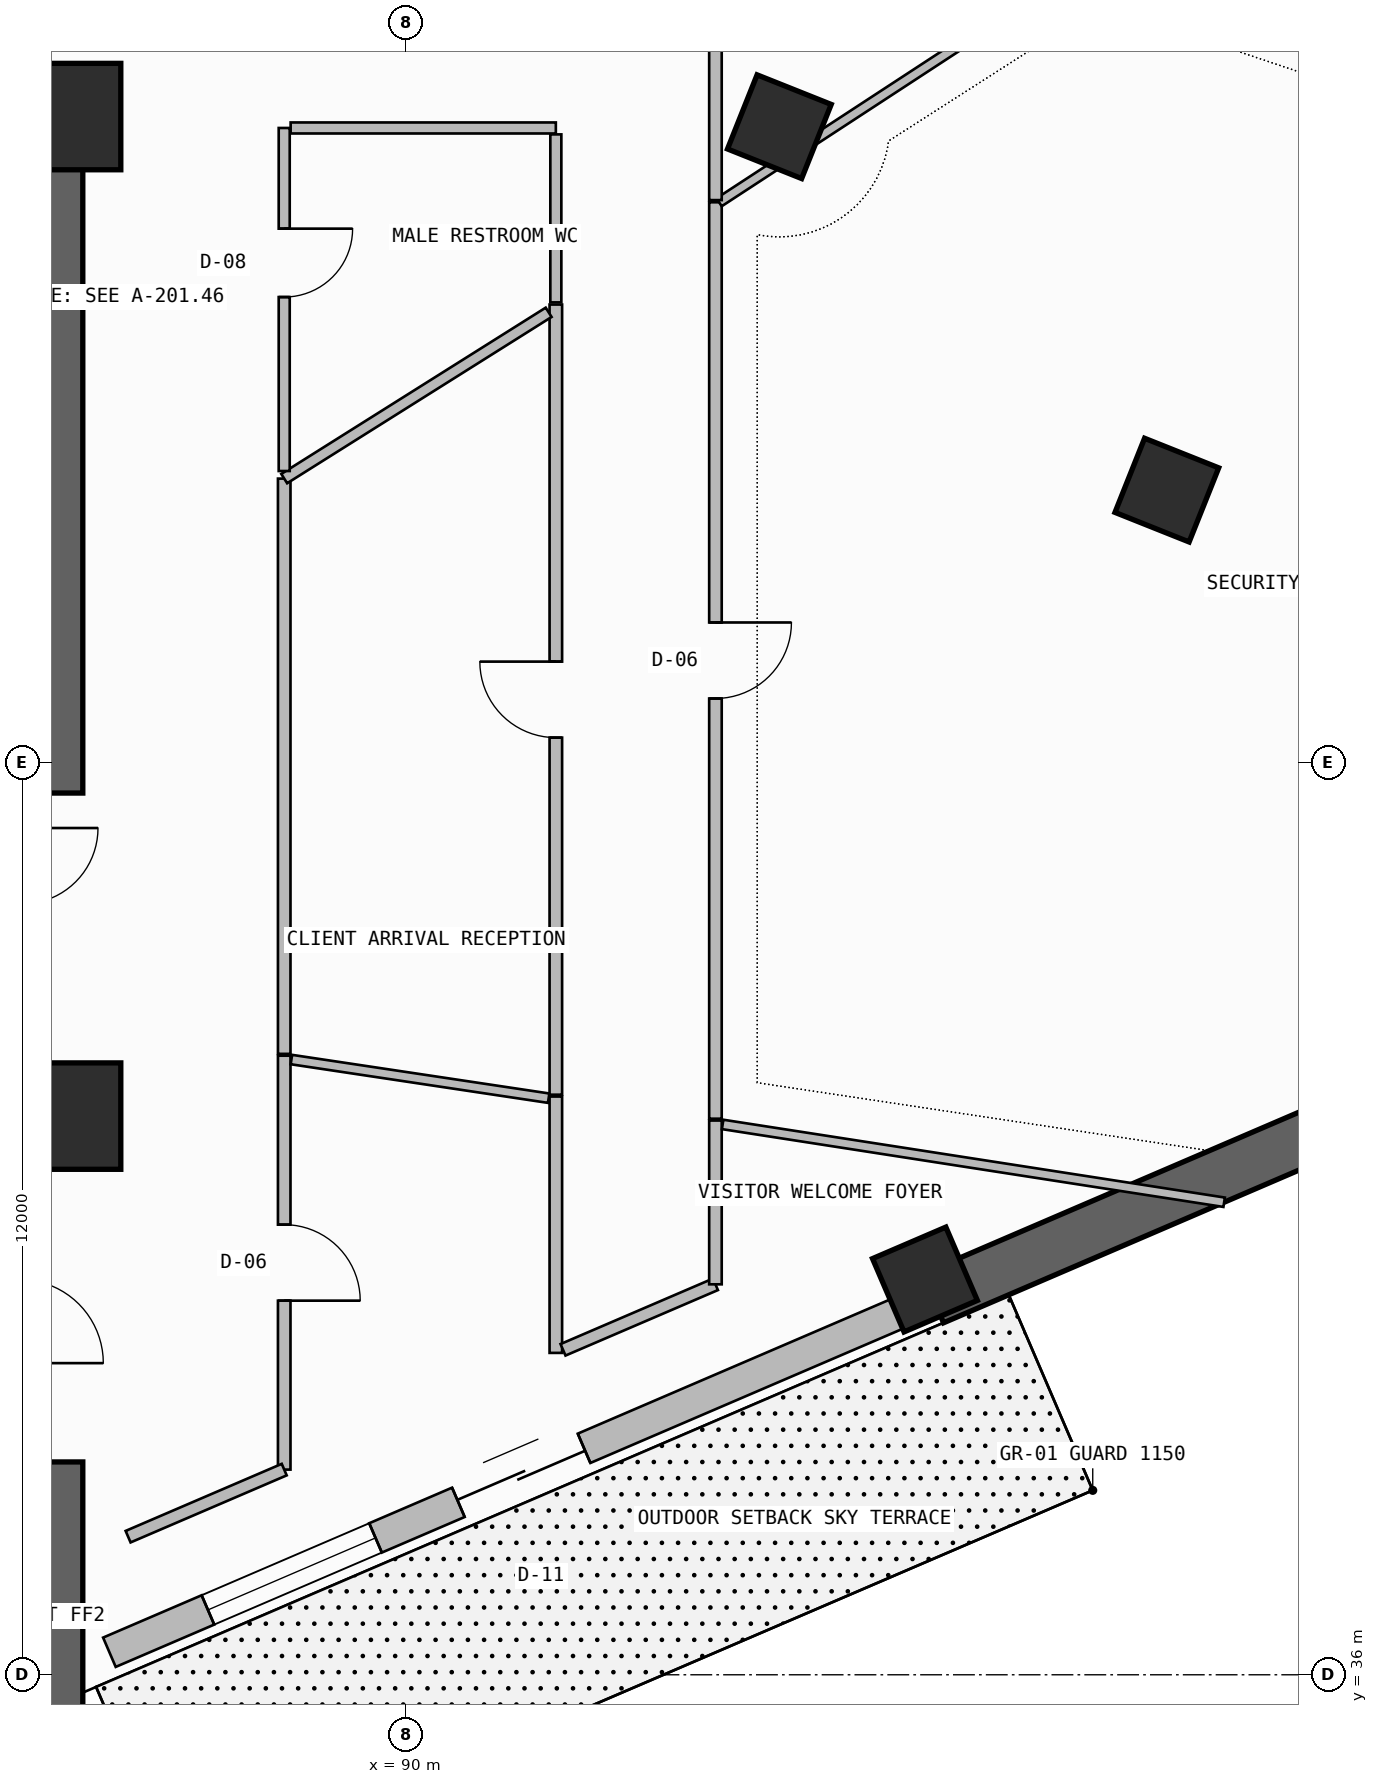
"""IFC4 building model, lengths in metres.
Left out: names, types, materials, properties, quantities, classifications, styles, units other than length and angle.
Written with IfcOpenShell. Run it as: python <this file> out.ifc"""

import sys

from ifc_helpers import new_model, si_unit, direction, frame, frame_2d, origin, origin_2d, place, context, subcontext, project, spatial, rectangle, extrude, element, fill, save


model = new_model("IFC4")
c1 = context("Model", 3, precision=1e-05, world=origin(), true_north=direction((0.0, 1.0)))
c2 = subcontext(c1, "Body", "Model", "MODEL_VIEW")
j1 = project(units=[si_unit("LENGTHUNIT", "METRE"), si_unit("PLANEANGLEUNIT", "RADIAN")], contexts=[c1])
p1 = place(None, origin())
s1 = spatial("IfcSite", under=j1, at=p1, CompositionType="ELEMENT")
p2 = place(p1, origin())
s2 = spatial("IfcBuilding", under=s1, at=p2, CompositionType="ELEMENT")
p3 = place(p2, frame((0.0, 0.0, 164.7)))
s3 = spatial("IfcBuildingStorey", under=s2, at=p3, CompositionType="ELEMENT", Elevation=164.7)
p4 = place(p3, frame((85.375, 35.5, -0.4), z_axis=(0.0, 0.0, 1.0), x_axis=(0.0, 1.0, 0.0)))
e1 = element("IfcWall", 1, at=p4, inside=s3, PredefinedType="SHEAR", context=c2, shape_type="SweptSolid", body=[
    extrude(rectangle(XDim=3.3, YDim=0.75, at=frame_2d((1.65, 0.0))), origin(), (0.0, 0.0, 1.0), 3.74),
])
p5 = place(p3, frame((72.0, 56.425, -0.4), z_axis=(0.0, 0.0, 1.0), x_axis=(1.0, 0.0, 0.0)))
e2 = element("IfcWall", 2, at=p5, inside=s3, PredefinedType="SHEAR", context=c2, shape_type="SweptSolid", body=[
    extrude(rectangle(XDim=13.75, YDim=0.75, at=frame_2d((6.875, 0.0))), origin(), (0.0, 0.0, 1.0), 3.74),
])
p6 = place(p3, frame((85.375, 47.6, -0.4), z_axis=(0.0, 0.0, 1.0), x_axis=(0.0, 1.0, 0.0)))
e3 = element("IfcWall", 3, at=p6, inside=s3, PredefinedType="SHEAR", context=c2, shape_type="SweptSolid", body=[
    extrude(rectangle(XDim=8.45, YDim=0.75, at=frame_2d((4.225, 0.0))), origin(), (0.0, 0.0, 1.0), 3.74),
])
for number, where, z_axis, x_axis in (
    (4, (85.55, 43.35, 0.0), (0.0, 0.0, 1.0), (1.0, 0.0, 0.0)),
    (5, (85.55, 56.5, 0.0), (0.0, 0.0, 1.0), (1.0, 0.0, 0.0)),
):
    element("IfcColumn", number, at=place(p3, frame(where, z_axis=z_axis, x_axis=x_axis)), inside=s3, PredefinedType="COLUMN", context=c2, shape_type="SweptSolid", body=[
        extrude(rectangle(XDim=1.4, YDim=1.4, at=origin_2d()), origin(), (0.0, 0.0, 1.0), 3.6),
    ])
for number, where, z_axis, x_axis in (
    (6, (96.83, 41.2, -0.4), (0.0, 0.0, 1.0), (0.919, 0.395, 0.0)),
    (7, (100.013, 51.585, -0.4), (0.0, 0.0, 1.0), (0.371, 0.929, 0.0)),
    (8, (94.915, 56.367, -0.4), (0.0, 0.0, 1.0), (0.371, 0.929, 0.0)),
):
    element("IfcColumn", number, at=place(p3, frame(where, z_axis=z_axis, x_axis=x_axis)), inside=s3, PredefinedType="COLUMN", context=c2, shape_type="SweptSolid", body=[
        extrude(rectangle(XDim=1.05, YDim=1.05, at=origin_2d()), origin(), (0.0, 0.0, 1.0), 4.0),
    ])
p7 = place(p3, frame((86.1, 36.296, 0.0), z_axis=(0.0, 0.0, 1.0), x_axis=(0.918792412723, 0.394741057306, 0.0)))
e9 = element("IfcWall", 9, at=p7, inside=s3, PredefinedType="SOLIDWALL", context=c2, shape_type="SweptSolid", body=[
    extrude(rectangle(XDim=11.794, YDim=0.42, at=frame_2d((5.897, 0.0))), origin(), (0.0, 0.0, 1.0), 2.725),
])
p8 = place(p7, frame((4.997, 0.0, 0.0)))
e10 = element("IfcOpeningElement", 10, at=p8, cuts=e9, PredefinedType="OPENING", context=c2, shape_type="SweptSolid", body=[
    extrude(rectangle(XDim=1.8, YDim=2.35, at=frame_2d((0.9, 1.175))), frame((0.0, 0.22, 0.0), z_axis=(0.0, -1.0, 0.0), x_axis=(1.0, 0.0, 0.0)), (0.0, 0.0, 1.0), 0.44),
])
p9 = place(p7, frame((1.411, 0.0, 1.2)))
e11 = element("IfcOpeningElement", 11, at=p9, cuts=e9, PredefinedType="OPENING", context=c2, shape_type="SweptSolid", body=[
    extrude(rectangle(XDim=2.4, YDim=0.9, at=frame_2d((1.2, 0.45))), frame((0.0, 0.22, 0.0), z_axis=(0.0, -1.0, 0.0), x_axis=(1.0, 0.0, 0.0)), (0.0, 0.0, 1.0), 0.44),
])
p10 = place(p3, frame((96.937, 40.952, -0.4), z_axis=(0.0, 0.0, 1.0), x_axis=(0.918782407933, 0.394764343468, 0.0)))
e12 = element("IfcWall", 12, at=p10, inside=s3, PredefinedType="SHEAR", context=c2, shape_type="SweptSolid", body=[
    extrude(rectangle(XDim=8.402, YDim=0.7, at=frame_2d((4.201, 0.0))), origin(), (0.0, 0.0, 1.0), 3.74),
])
p11 = place(p3, frame((117.363, 52.344, 0.0), z_axis=(0.0, 0.0, 1.0), x_axis=(-0.94800468727, 0.31825636351, 0.0)))
e13 = element("IfcWall", 13, at=p11, inside=s3, PredefinedType="PARAPET", context=c2, shape_type="SweptSolid", body=[
    extrude(rectangle(XDim=31.869, YDim=0.2, at=frame_2d((15.935, 0.0))), origin(), (0.0, 0.0, 1.0), 1.15),
])
p12 = place(p3, frame((88.4, 38.699, 0.0), z_axis=(0.0, 0.0, 1.0), x_axis=(0.0, 1.0, 0.0)))
e14 = element("IfcWall", 14, at=p12, inside=s3, PredefinedType="PARTITIONING", context=c2, shape_type="SweptSolid", body=[
    extrude(rectangle(XDim=5.445, YDim=0.165, at=frame_2d((2.723, 0.0))), origin(), (0.0, 0.0, 1.0), 2.825),
])
p13 = place(p12, frame((2.223, 0.0, 0.0)))
e15 = element("IfcOpeningElement", 15, at=p13, cuts=e14, PredefinedType="OPENING", context=c2, shape_type="SweptSolid", body=[
    extrude(rectangle(XDim=1.0, YDim=2.2, at=frame_2d((0.5, 1.1))), frame((0.0, 0.093, 0.0), z_axis=(0.0, -1.0, 0.0), x_axis=(1.0, 0.0, 0.0)), (0.0, 0.0, 1.0), 0.185),
])
p14 = place(p3, frame((91.974, 43.607, 0.0), z_axis=(0.0, 0.0, 1.0), x_axis=(0.0, -1.0, 0.0)))
e16 = element("IfcWall", 16, at=p14, inside=s3, PredefinedType="PARTITIONING", context=c2, shape_type="SweptSolid", body=[
    extrude(rectangle(XDim=3.373, YDim=0.165, at=frame_2d((1.687, 0.0))), origin(), (0.0, 0.0, 1.0), 2.825),
])
p15 = place(p3, frame((92.068, 40.275, 0.0), z_axis=(0.0, 0.0, 1.0), x_axis=(0.91880916067, 0.394702072794, 0.0)))
e17 = element("IfcWall", 17, at=p15, inside=s3, PredefinedType="PARTITIONING", context=c2, shape_type="SweptSolid", body=[
    extrude(rectangle(XDim=2.183, YDim=0.165, at=frame_2d((1.091, 0.0))), origin(), (0.0, 0.0, 1.0), 3.34),
])
p16 = place(p3, frame((86.346, 37.817, 0.0), z_axis=(0.0, 0.0, 1.0), x_axis=(0.918811412195, 0.394696831531, 0.0)))
e18 = element("IfcWall", 18, at=p16, inside=s3, PredefinedType="PARTITIONING", context=c2, shape_type="SweptSolid", body=[
    extrude(rectangle(XDim=2.235, YDim=0.165, at=frame_2d((1.118, 0.0))), origin(), (0.0, 0.0, 1.0), 3.34),
])
p17 = place(p3, frame((94.074, 41.137, 0.0), z_axis=(0.0, 0.0, 1.0), x_axis=(0.0, 1.0, 0.0)))
e19 = element("IfcWall", 19, at=p17, inside=s3, PredefinedType="PARTITIONING", context=c2, shape_type="SweptSolid", body=[
    extrude(rectangle(XDim=2.155, YDim=0.165, at=frame_2d((1.077, 0.0))), origin(), (0.0, 0.0, 1.0), 2.825),
])
p18 = place(p3, frame((94.168, 43.24, 0.0), z_axis=(0.0, 0.0, 1.0), x_axis=(0.988173043675, -0.153342869914, 0.0)))
e20 = element("IfcWall", 20, at=p18, inside=s3, PredefinedType="PARTITIONING", context=c2, shape_type="SweptSolid", body=[
    extrude(rectangle(XDim=6.677, YDim=0.125, at=frame_2d((3.339, 0.0))), origin(), (0.0, 0.0, 1.0), 2.725),
])
p19 = place(p3, frame((88.494, 44.094, 0.0), z_axis=(0.0, 0.0, 1.0), x_axis=(0.988911225156, -0.148507874407, 0.0)))
e21 = element("IfcWall", 21, at=p19, inside=s3, PredefinedType="PARTITIONING", context=c2, shape_type="SweptSolid", body=[
    extrude(rectangle(XDim=3.423, YDim=0.125, at=frame_2d((1.711, 0.0))), origin(), (0.0, 0.0, 1.0), 2.825),
])
p20 = place(p3, frame((94.074, 43.316, 0.0), z_axis=(0.0, 0.0, 1.0), x_axis=(0.0, 1.0, 0.0)))
e22 = element("IfcWall", 22, at=p20, inside=s3, PredefinedType="PARTITIONING", context=c2, shape_type="SweptSolid", body=[
    extrude(rectangle(XDim=12.057, YDim=0.165, at=frame_2d((6.028, 0.0))), origin(), (0.0, 0.0, 1.0), 2.825),
])
p21 = place(p20, frame((5.528, 0.0, 0.0)))
e23 = element("IfcOpeningElement", 23, at=p21, cuts=e22, PredefinedType="OPENING", context=c2, shape_type="SweptSolid", body=[
    extrude(rectangle(XDim=1.0, YDim=2.2, at=frame_2d((0.5, 1.1))), frame((0.0, 0.093, 0.0), z_axis=(0.0, -1.0, 0.0), x_axis=(1.0, 0.0, 0.0)), (0.0, 0.0, 1.0), 0.185),
])
p22 = place(p3, frame((94.122, 55.373, 0.0), z_axis=(0.0, 0.0, 1.0), x_axis=(0.837125239486, 0.547011273573, 0.0)))
e24 = element("IfcWall", 24, at=p22, inside=s3, PredefinedType="PARTITIONING", context=c2, shape_type="SweptSolid", body=[
    extrude(rectangle(XDim=5.968, YDim=0.125, at=frame_2d((2.984, 0.0))), origin(), (0.0, 0.0, 1.0), 2.725),
])
p23 = place(p3, frame((91.974, 54.027, 0.0), z_axis=(0.0, 0.0, 1.0), x_axis=(0.0, -1.0, 0.0)))
e25 = element("IfcWall", 25, at=p23, inside=s3, PredefinedType="PARTITIONING", context=c2, shape_type="SweptSolid", body=[
    extrude(rectangle(XDim=10.395, YDim=0.165, at=frame_2d((5.198, 0.0))), origin(), (0.0, 0.0, 1.0), 2.825),
])
p24 = place(p23, frame((4.698, 0.0, 0.0)))
e26 = element("IfcOpeningElement", 26, at=p24, cuts=e25, PredefinedType="OPENING", context=c2, shape_type="SweptSolid", body=[
    extrude(rectangle(XDim=1.0, YDim=2.2, at=frame_2d((0.5, 1.1))), frame((0.0, 0.093, 0.0), z_axis=(0.0, -1.0, 0.0), x_axis=(1.0, 0.0, 0.0)), (0.0, 0.0, 1.0), 0.185),
])
p25 = place(p3, frame((88.4, 44.169, 0.0), z_axis=(0.0, 0.0, 1.0), x_axis=(0.0, 1.0, 0.0)))
e27 = element("IfcWall", 27, at=p25, inside=s3, PredefinedType="PARTITIONING", context=c2, shape_type="SweptSolid", body=[
    extrude(rectangle(XDim=7.568, YDim=0.165, at=frame_2d((3.784, 0.0))), origin(), (0.0, 0.0, 1.0), 3.34),
])
p26 = place(p3, frame((88.4, 51.737, 0.0), z_axis=(0.0, 0.0, 1.0), x_axis=(0.846550127573, 0.532309009416, 0.0)))
e28 = element("IfcWall", 28, at=p26, inside=s3, PredefinedType="PARTITIONING", context=c2, shape_type="SweptSolid", body=[
    extrude(rectangle(XDim=4.11, YDim=0.145, at=frame_2d((2.055, 0.0))), origin(), (0.0, 0.0, 1.0), 2.925),
])
p27 = place(p3, frame((88.4, 51.837, 0.0), z_axis=(0.0, 0.0, 1.0), x_axis=(0.0, 1.0, 0.0)))
e29 = element("IfcWall", 29, at=p27, inside=s3, PredefinedType="PARTITIONING", context=c2, shape_type="SweptSolid", body=[
    extrude(rectangle(XDim=4.513, YDim=0.145, at=frame_2d((2.257, 0.0))), origin(), (0.0, 0.0, 1.0), 2.825),
])
p28 = place(p27, frame((2.289, 0.0, 0.0)))
e30 = element("IfcOpeningElement", 30, at=p28, cuts=e29, PredefinedType="OPENING", context=c2, shape_type="SweptSolid", body=[
    extrude(rectangle(XDim=0.9, YDim=2.1, at=frame_2d((0.45, 1.05))), frame((0.0, 0.083, 0.0), z_axis=(0.0, -1.0, 0.0), x_axis=(1.0, 0.0, 0.0)), (0.0, 0.0, 1.0), 0.165),
])
p29 = place(p3, frame((88.485, 56.35, 0.0), z_axis=(0.0, 0.0, 1.0), x_axis=(1.0, 0.0, 0.0)))
e31 = element("IfcWall", 31, at=p29, inside=s3, PredefinedType="PARTITIONING", context=c2, shape_type="SweptSolid", body=[
    extrude(rectangle(XDim=3.489, YDim=0.145, at=frame_2d((1.745, 0.0))), origin(), (0.0, 0.0, 1.0), 2.825),
])
p30 = place(p3, frame((91.974, 56.265, 0.0), z_axis=(0.0, 0.0, 1.0), x_axis=(0.0, -1.0, 0.0)))
e32 = element("IfcWall", 32, at=p30, inside=s3, PredefinedType="PARTITIONING", context=c2, shape_type="SweptSolid", body=[
    extrude(rectangle(XDim=2.21, YDim=0.145, at=frame_2d((1.105, 0.0))), origin(), (0.0, 0.0, 1.0), 2.825),
])
p31 = place(p3, frame((94.074, 55.401, 0.0), z_axis=(0.0, 0.0, 1.0), x_axis=(0.0, 1.0, 0.0)))
e33 = element("IfcWall", 33, at=p31, inside=s3, PredefinedType="PARTITIONING", context=c2, shape_type="SweptSolid", body=[
    extrude(rectangle(XDim=3.424, YDim=0.165, at=frame_2d((1.712, 0.0))), origin(), (0.0, 0.0, 1.0), 2.725),
])
p32 = place(p8, origin())
e34 = element("IfcDoor", 34, at=p32, inside=s3, OperationType="DOUBLE_DOOR_SLIDING", PredefinedType="DOOR", context=c2, shape_type="SweptSolid", body=[
    extrude(rectangle(XDim=1.8, YDim=2.35, at=frame_2d((0.9, 1.175))), frame((0.0, 0.025, 0.0), z_axis=(0.0, -1.0, 0.0), x_axis=(1.0, 0.0, 0.0)), (0.0, 0.0, 1.0), 0.05),
])
fill(e10, e34)
p33 = place(p9, origin())
e35 = element("IfcWindow", 35, at=p33, inside=s3, PartitioningType="SINGLE_PANEL", PredefinedType="WINDOW", context=c2, shape_type="SweptSolid", body=[
    extrude(rectangle(XDim=2.4, YDim=0.9, at=frame_2d((1.2, 0.45))), frame((0.0, 0.03, 0.0), z_axis=(0.0, -1.0, 0.0), x_axis=(1.0, 0.0, 0.0)), (0.0, 0.0, 1.0), 0.06),
])
fill(e11, e35)
p34 = place(p13, frame((1.0, 0.0, 0.0), z_axis=(0.0, 0.0, 1.0), x_axis=(-1.0, 0.0, 0.0)))
e36 = element("IfcDoor", 36, at=p34, inside=s3, OperationType="SINGLE_SWING_RIGHT", PredefinedType="DOOR", context=c2, shape_type="SweptSolid", body=[
    extrude(rectangle(XDim=1.0, YDim=2.2, at=frame_2d((0.5, 1.1))), frame((0.0, 0.025, 0.0), z_axis=(0.0, -1.0, 0.0), x_axis=(1.0, 0.0, 0.0)), (0.0, 0.0, 1.0), 0.05),
])
fill(e15, e36)
p35 = place(p21, frame((1.0, 0.0, 0.0), z_axis=(0.0, 0.0, 1.0), x_axis=(-1.0, 0.0, 0.0)))
e37 = element("IfcDoor", 37, at=p35, inside=s3, OperationType="SINGLE_SWING_LEFT", PredefinedType="DOOR", context=c2, shape_type="SweptSolid", body=[
    extrude(rectangle(XDim=1.0, YDim=2.2, at=frame_2d((0.5, 1.1))), frame((0.0, 0.025, 0.0), z_axis=(0.0, -1.0, 0.0), x_axis=(1.0, 0.0, 0.0)), (0.0, 0.0, 1.0), 0.05),
])
fill(e23, e37)
p36 = place(p24, frame((1.0, 0.0, 0.0), z_axis=(0.0, 0.0, 1.0), x_axis=(-1.0, 0.0, 0.0)))
e38 = element("IfcDoor", 38, at=p36, inside=s3, OperationType="SINGLE_SWING_RIGHT", PredefinedType="DOOR", context=c2, shape_type="SweptSolid", body=[
    extrude(rectangle(XDim=1.0, YDim=2.2, at=frame_2d((0.5, 1.1))), frame((0.0, 0.025, 0.0), z_axis=(0.0, -1.0, 0.0), x_axis=(1.0, 0.0, 0.0)), (0.0, 0.0, 1.0), 0.05),
])
fill(e26, e38)
p37 = place(p28, frame((0.9, 0.0, 0.0), z_axis=(0.0, 0.0, 1.0), x_axis=(-1.0, 0.0, 0.0)))
e39 = element("IfcDoor", 39, at=p37, inside=s3, OperationType="SINGLE_SWING_LEFT", PredefinedType="DOOR", context=c2, shape_type="SweptSolid", body=[
    extrude(rectangle(XDim=0.9, YDim=2.1, at=frame_2d((0.45, 1.05))), frame((0.0, 0.025, 0.0), z_axis=(0.0, -1.0, 0.0), x_axis=(1.0, 0.0, 0.0)), (0.0, 0.0, 1.0), 0.05),
])
fill(e30, e39)
save(model, sys.argv[1])
